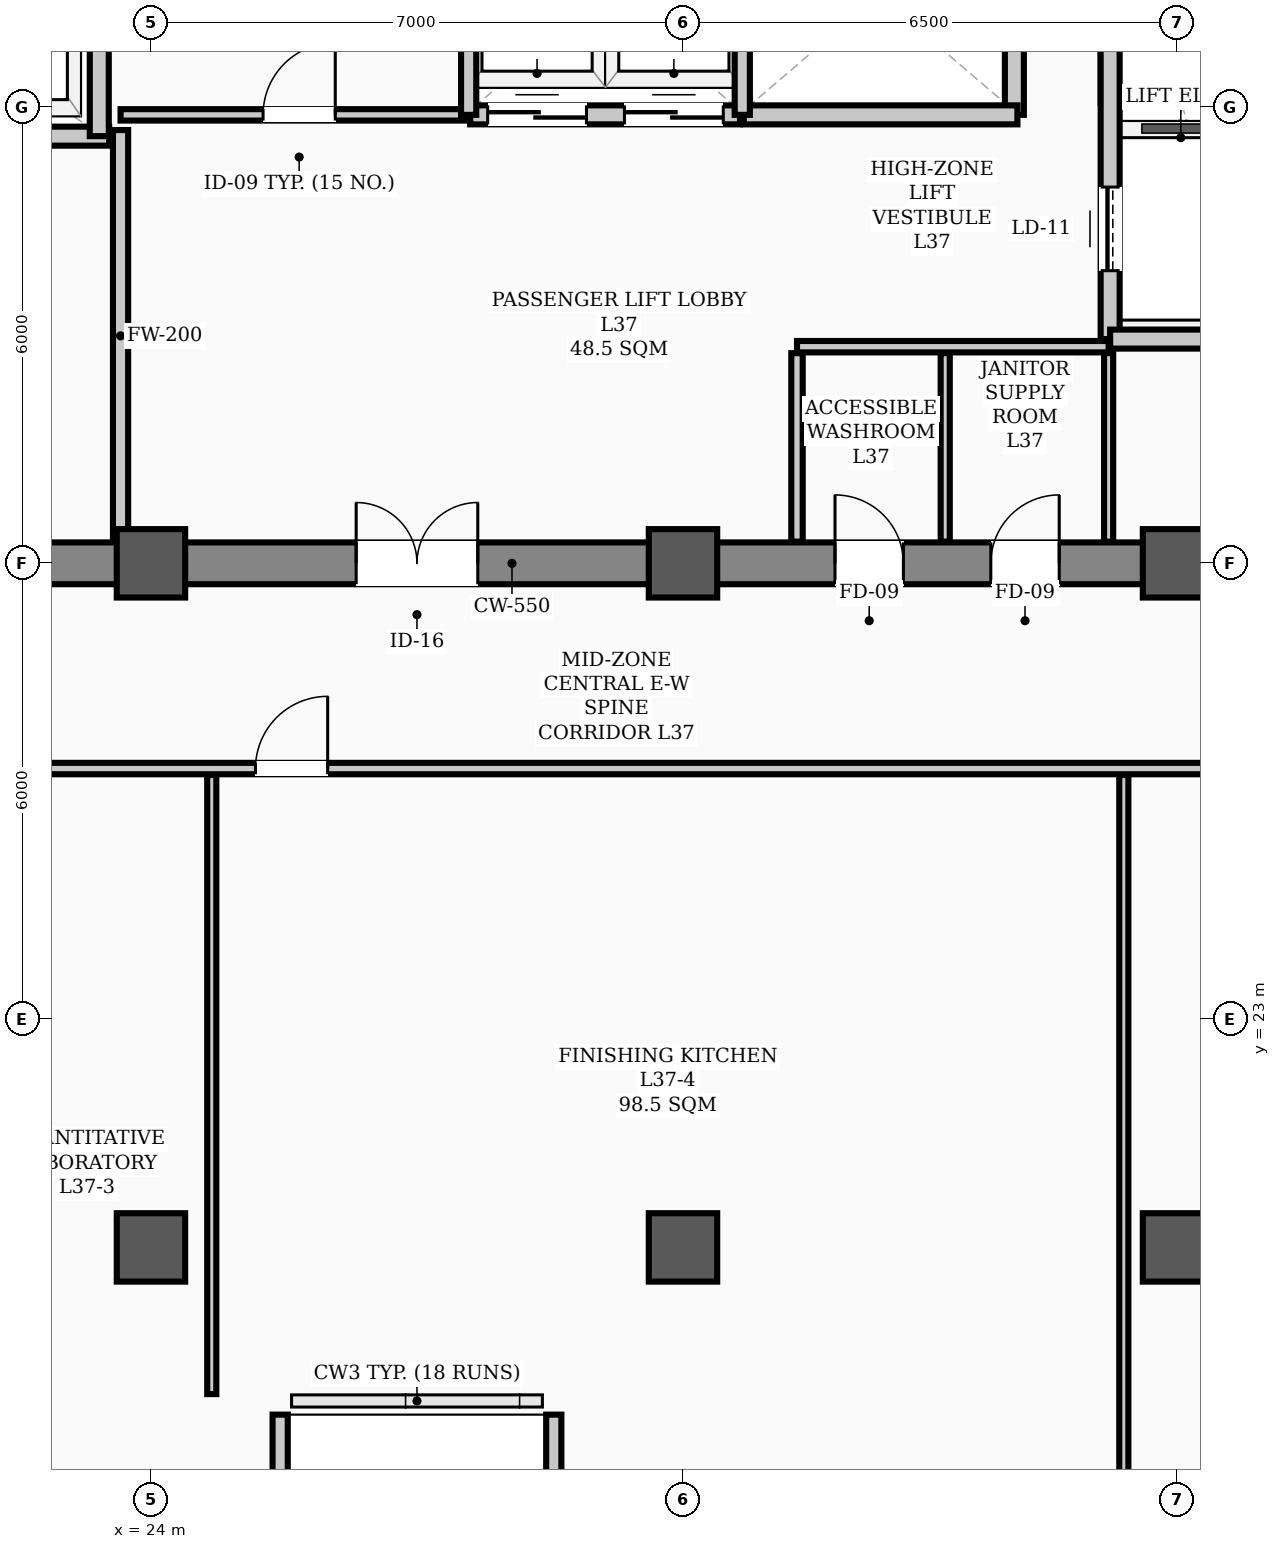
"""IFC4 building model, lengths in metres.
Left out: names, types, materials, properties, quantities, classifications, styles, units other than length and angle.
Written with IfcOpenShell. Run it as: python <this file> out.ifc"""

import sys

from ifc_helpers import new_model, si_unit, direction, frame, frame_2d, origin, origin_2d, place, context, subcontext, project, spatial, rectangle, hollow_rectangle, extrude, element, fill, save


model = new_model("IFC4")
c1 = context("Model", 3, precision=1e-05, world=origin(), true_north=direction((0.0, 1.0)))
c2 = subcontext(c1, "Body", "Model", "MODEL_VIEW")
j1 = project(units=[si_unit("LENGTHUNIT", "METRE"), si_unit("PLANEANGLEUNIT", "RADIAN")], contexts=[c1])
p1 = place(None, origin())
s1 = spatial("IfcSite", under=j1, at=p1, CompositionType="ELEMENT")
p2 = place(p1, origin())
s2 = spatial("IfcBuilding", under=s1, at=p2, CompositionType="ELEMENT")
p3 = place(p2, frame((0.0, 0.0, 150.0)))
s3 = spatial("IfcBuildingStorey", under=s2, at=p3, CompositionType="ELEMENT", Elevation=150.0)
for number, where, z_axis, x_axis in (
    (1, (24.0, 29.0, 0.0), (0.0, 0.0, 1.0), (1.0, 0.0, 0.0)),
    (2, (31.0, 29.0, 0.0), (0.0, 0.0, 1.0), (1.0, 0.0, 0.0)),
    (3, (37.5, 29.0, 0.0), (0.0, 0.0, 1.0), (1.0, 0.0, 0.0)),
    (4, (24.0, 20.0, 0.0), (0.0, 0.0, 1.0), (1.0, 0.0, 0.0)),
    (5, (31.0, 20.0, 0.0), (0.0, 0.0, 1.0), (1.0, 0.0, 0.0)),
    (6, (37.5, 20.0, 0.0), (0.0, 0.0, 1.0), (1.0, 0.0, 0.0)),
):
    element("IfcColumn", number, at=place(p3, frame(where, z_axis=z_axis, x_axis=x_axis)), inside=s3, PredefinedType="COLUMN", context=c2, shape_type="SweptSolid", body=[
        extrude(hollow_rectangle(XDim=0.9, YDim=0.9, WallThickness=0.035, InnerFilletRadius=0.017, OuterFilletRadius=0.052, at=origin_2d()), origin(), (0.0, 0.0, 1.0), 3.9),
    ])
for number, where, z_axis, x_axis in (
    (7, (25.7, 16.1, 0.0), (0.0, 0.0, 1.0), (0.0, 1.0, 0.0)),
    (8, (29.3, 17.8, 0.0), (0.0, 0.0, 1.0), (0.0, -1.0, 0.0)),
):
    element("IfcWall", number, at=place(p3, frame(where, z_axis=z_axis, x_axis=x_axis)), inside=s3, PredefinedType="PARAPET", context=c2, shape_type="SweptSolid", body=[
        extrude(rectangle(XDim=1.7, YDim=0.2, at=frame_2d((0.85, 0.0))), origin(), (0.0, 0.0, 1.0), 1.2),
    ])
p4 = place(p3, frame((13.5, 29.0, 0.0), z_axis=(0.0, 0.0, 1.0), x_axis=(1.0, 0.0, 0.0)))
e9 = element("IfcWall", 9, at=p4, inside=s3, PredefinedType="SHEAR", context=c2, shape_type="SweptSolid", body=[
    extrude(rectangle(XDim=30.5, YDim=0.55, at=frame_2d((15.25, 0.0))), origin(), (0.0, 0.0, 1.0), 3.72),
])
p5 = place(p4, frame((1.75, 0.0, 0.0)))
e10 = element("IfcOpeningElement", 10, at=p5, cuts=e9, PredefinedType="OPENING", context=c2, shape_type="SweptSolid", body=[
    extrude(rectangle(XDim=1.1, YDim=2.08, at=frame_2d((0.55, 1.04))), frame((0.0, 0.285, 0.0), z_axis=(0.0, -1.0, 0.0), x_axis=(1.0, 0.0, 0.0)), (0.0, 0.0, 1.0), 0.57),
])
p6 = place(p4, frame((26.7, 0.0, 0.0)))
e11 = element("IfcOpeningElement", 11, at=p6, cuts=e9, PredefinedType="OPENING", context=c2, shape_type="SweptSolid", body=[
    extrude(rectangle(XDim=1.1, YDim=2.08, at=frame_2d((0.55, 1.04))), frame((0.0, 0.285, 0.0), z_axis=(0.0, -1.0, 0.0), x_axis=(1.0, 0.0, 0.0)), (0.0, 0.0, 1.0), 0.57),
])
p7 = place(p4, frame((6.8, 0.0, 0.0)))
e12 = element("IfcOpeningElement", 12, at=p7, cuts=e9, PredefinedType="OPENING", context=c2, shape_type="SweptSolid", body=[
    extrude(rectangle(XDim=1.1, YDim=2.08, at=frame_2d((0.55, 1.04))), frame((0.0, 0.285, 0.0), z_axis=(0.0, -1.0, 0.0), x_axis=(1.0, 0.0, 0.0)), (0.0, 0.0, 1.0), 0.57),
])
p8 = place(p4, frame((13.2, 0.0, 0.0)))
e13 = element("IfcOpeningElement", 13, at=p8, cuts=e9, PredefinedType="OPENING", context=c2, shape_type="SweptSolid", body=[
    extrude(rectangle(XDim=1.6, YDim=2.08, at=frame_2d((0.8, 1.04))), frame((0.0, 0.285, 0.0), z_axis=(0.0, -1.0, 0.0), x_axis=(1.0, 0.0, 0.0)), (0.0, 0.0, 1.0), 0.57),
])
p9 = place(p4, frame((19.5, 0.0, 0.0)))
e14 = element("IfcOpeningElement", 14, at=p9, cuts=e9, PredefinedType="OPENING", context=c2, shape_type="SweptSolid", body=[
    extrude(rectangle(XDim=0.9, YDim=2.08, at=frame_2d((0.45, 1.04))), frame((0.0, 0.285, 0.0), z_axis=(0.0, -1.0, 0.0), x_axis=(1.0, 0.0, 0.0)), (0.0, 0.0, 1.0), 0.57),
])
p10 = place(p4, frame((21.55, 0.0, 0.0)))
e15 = element("IfcOpeningElement", 15, at=p10, cuts=e9, PredefinedType="OPENING", context=c2, shape_type="SweptSolid", body=[
    extrude(rectangle(XDim=0.9, YDim=2.08, at=frame_2d((0.45, 1.04))), frame((0.0, 0.285, 0.0), z_axis=(0.0, -1.0, 0.0), x_axis=(1.0, 0.0, 0.0)), (0.0, 0.0, 1.0), 0.57),
])
p11 = place(p3, frame((18.1, 34.62, 0.0), z_axis=(0.0, 0.0, 1.0), x_axis=(1.0, 0.0, 0.0)))
e16 = element("IfcWall", 16, at=p11, inside=s3, PredefinedType="STANDARD", context=c2, shape_type="SweptSolid", body=[
    extrude(rectangle(XDim=5.35, YDim=0.25, at=frame_2d((2.675, 0.0))), origin(), (0.0, 0.0, 1.0), 3.72),
])
p12 = place(p11, frame((0.85, 0.0, 0.0)))
e17 = element("IfcOpeningElement", 17, at=p12, cuts=e16, PredefinedType="OPENING", context=c2, shape_type="SweptSolid", body=[
    extrude(rectangle(XDim=1.1, YDim=2.08, at=frame_2d((0.55, 1.04))), frame((0.0, 0.135, 0.0), z_axis=(0.0, -1.0, 0.0), x_axis=(1.0, 0.0, 0.0)), (0.0, 0.0, 1.0), 0.27),
])
p13 = place(p11, frame((3.45, 0.0, 0.0)))
e18 = element("IfcOpeningElement", 18, at=p13, cuts=e16, PredefinedType="OPENING", context=c2, shape_type="SweptSolid", body=[
    extrude(rectangle(XDim=1.1, YDim=2.08, at=frame_2d((0.55, 1.04))), frame((0.0, 0.135, 0.0), z_axis=(0.0, -1.0, 0.0), x_axis=(1.0, 0.0, 0.0)), (0.0, 0.0, 1.0), 0.27),
])
p14 = place(p3, frame((36.62, 31.95, 0.0), z_axis=(0.0, 0.0, 1.0), x_axis=(0.0, 1.0, 0.0)))
e19 = element("IfcWall", 19, at=p14, inside=s3, PredefinedType="STANDARD", context=c2, shape_type="SweptSolid", body=[
    extrude(rectangle(XDim=6.0, YDim=0.25, at=frame_2d((3.0, 0.0))), origin(), (0.0, 0.0, 1.0), 3.35),
])
p15 = place(p14, frame((0.9, 0.0, 0.0)))
e20 = element("IfcOpeningElement", 20, at=p15, cuts=e19, PredefinedType="OPENING", context=c2, shape_type="SweptSolid", body=[
    extrude(rectangle(XDim=1.1, YDim=2.08, at=frame_2d((0.55, 1.04))), frame((0.0, 0.135, 0.0), z_axis=(0.0, -1.0, 0.0), x_axis=(1.0, 0.0, 0.0)), (0.0, 0.0, 1.0), 0.27),
])
p16 = place(p14, frame((4.0, 0.0, 0.0)))
e21 = element("IfcOpeningElement", 21, at=p16, cuts=e19, PredefinedType="OPENING", context=c2, shape_type="SweptSolid", body=[
    extrude(rectangle(XDim=1.1, YDim=2.08, at=frame_2d((0.55, 1.04))), frame((0.0, 0.135, 0.0), z_axis=(0.0, -1.0, 0.0), x_axis=(1.0, 0.0, 0.0)), (0.0, 0.0, 1.0), 0.27),
])
p17 = place(p3, frame((36.62, 31.95, 0.0), z_axis=(0.0, 0.0, 1.0), x_axis=(1.0, 0.0, 0.0)))
e22 = element("IfcWall", 22, at=p17, inside=s3, PredefinedType="STANDARD", context=c2, shape_type="SweptSolid", body=[
    extrude(rectangle(XDim=1.9, YDim=0.25, at=frame_2d((0.95, 0.0))), origin(), (0.0, 0.0, 1.0), 3.48),
])
p18 = place(p3, frame((23.32, 34.62, 0.0), z_axis=(0.0, 0.0, 1.0), x_axis=(0.0, 1.0, 0.0)))
e23 = element("IfcWall", 23, at=p18, inside=s3, PredefinedType="STANDARD", context=c2, shape_type="SweptSolid", body=[
    extrude(rectangle(XDim=3.33, YDim=0.25, at=frame_2d((1.665, 0.0))), origin(), (0.0, 0.0, 1.0), 3.35),
])
p19 = place(p3, frame((35.36, 34.9, 0.0), z_axis=(0.0, 0.0, 1.0), x_axis=(0.0, 1.0, 0.0)))
e24 = element("IfcWall", 24, at=p19, inside=s3, PredefinedType="STANDARD", context=c2, shape_type="SweptSolid", body=[
    extrude(rectangle(XDim=3.05, YDim=0.25, at=frame_2d((1.525, 0.0))), origin(), (0.0, 0.0, 1.0), 3.35),
])
p20 = place(p3, frame((28.2, 34.9, 0.0), z_axis=(0.0, 0.0, 1.0), x_axis=(1.0, 0.0, 0.0)))
e25 = element("IfcWall", 25, at=p20, inside=s3, PredefinedType="STANDARD", context=c2, shape_type="SweptSolid", body=[
    extrude(rectangle(XDim=3.55, YDim=0.25, at=frame_2d((1.775, 0.0))), origin(), (0.0, 0.0, 1.0), 3.72),
])
p21 = place(p20, frame((0.23, 0.0, 0.0)))
e26 = element("IfcOpeningElement", 26, at=p21, cuts=e25, PredefinedType="OPENING", context=c2, shape_type="SweptSolid", body=[
    extrude(rectangle(XDim=1.3, YDim=2.08, at=frame_2d((0.65, 1.04))), frame((0.0, 0.135, 0.0), z_axis=(0.0, -1.0, 0.0), x_axis=(1.0, 0.0, 0.0)), (0.0, 0.0, 1.0), 0.27),
])
p22 = place(p20, frame((2.03, 0.0, 0.0)))
e27 = element("IfcOpeningElement", 27, at=p22, cuts=e25, PredefinedType="OPENING", context=c2, shape_type="SweptSolid", body=[
    extrude(rectangle(XDim=1.3, YDim=2.08, at=frame_2d((0.65, 1.04))), frame((0.0, 0.135, 0.0), z_axis=(0.0, -1.0, 0.0), x_axis=(1.0, 0.0, 0.0)), (0.0, 0.0, 1.0), 0.27),
])
p23 = place(p3, frame((31.8, 34.9, 0.0), z_axis=(0.0, 0.0, 1.0), x_axis=(1.0, 0.0, 0.0)))
e28 = element("IfcWall", 28, at=p23, inside=s3, PredefinedType="STANDARD", context=c2, shape_type="SweptSolid", body=[
    extrude(rectangle(XDim=3.6, YDim=0.25, at=frame_2d((1.8, 0.0))), origin(), (0.0, 0.0, 1.0), 3.72),
])
p24 = place(p3, frame((23.6, 34.9, 0.0), z_axis=(0.0, 0.0, 1.0), x_axis=(1.0, 0.0, 0.0)))
e29 = element("IfcWall", 29, at=p24, inside=s3, PredefinedType="PARTITIONING", context=c2, shape_type="SweptSolid", body=[
    extrude(rectangle(XDim=4.58, YDim=0.15, at=frame_2d((2.29, 0.0))), origin(), (0.0, 0.0, 1.0), 3.72),
])
p25 = place(p24, frame((1.875, 0.0, 0.0)))
e30 = element("IfcOpeningElement", 30, at=p25, cuts=e29, PredefinedType="OPENING", context=c2, shape_type="SweptSolid", body=[
    extrude(rectangle(XDim=0.95, YDim=2.08, at=frame_2d((0.475, 1.04))), frame((0.0, 0.085, 0.0), z_axis=(0.0, -1.0, 0.0), x_axis=(1.0, 0.0, 0.0)), (0.0, 0.0, 1.0), 0.17),
])
p26 = place(p3, frame((32.5, 31.85, 0.0), z_axis=(0.0, 0.0, 1.0), x_axis=(1.0, 0.0, 0.0)))
e31 = element("IfcWall", 31, at=p26, inside=s3, PredefinedType="PARTITIONING", context=c2, shape_type="SweptSolid", body=[
    extrude(rectangle(XDim=4.1, YDim=0.15, at=frame_2d((2.05, 0.0))), origin(), (0.0, 0.0, 1.0), 3.72),
])
p27 = place(p3, frame((2.31, 26.3, 0.0), z_axis=(0.0, 0.0, 1.0), x_axis=(1.0, 0.0, 0.0)))
e32 = element("IfcWall", 32, at=p27, inside=s3, PredefinedType="PARTITIONING", context=c2, shape_type="SweptSolid", body=[
    extrude(rectangle(XDim=46.38, YDim=0.15, at=frame_2d((23.19, 0.0))), origin(), (0.0, 0.0, 1.0), 3.2),
])
p28 = place(p27, frame((9.39, 0.0, 0.0)))
e33 = element("IfcOpeningElement", 33, at=p28, cuts=e32, PredefinedType="OPENING", context=c2, shape_type="SweptSolid", body=[
    extrude(rectangle(XDim=0.95, YDim=2.08, at=frame_2d((0.475, 1.04))), frame((0.0, 0.085, 0.0), z_axis=(0.0, -1.0, 0.0), x_axis=(1.0, 0.0, 0.0)), (0.0, 0.0, 1.0), 0.17),
])
p29 = place(p27, frame((14.215, 0.0, 0.0)))
e34 = element("IfcOpeningElement", 34, at=p29, cuts=e32, PredefinedType="OPENING", context=c2, shape_type="SweptSolid", body=[
    extrude(rectangle(XDim=0.95, YDim=2.08, at=frame_2d((0.475, 1.04))), frame((0.0, 0.085, 0.0), z_axis=(0.0, -1.0, 0.0), x_axis=(1.0, 0.0, 0.0)), (0.0, 0.0, 1.0), 0.17),
])
p30 = place(p27, frame((19.115, 0.0, 0.0)))
e35 = element("IfcOpeningElement", 35, at=p30, cuts=e32, PredefinedType="OPENING", context=c2, shape_type="SweptSolid", body=[
    extrude(rectangle(XDim=0.95, YDim=2.08, at=frame_2d((0.475, 1.04))), frame((0.0, 0.085, 0.0), z_axis=(0.0, -1.0, 0.0), x_axis=(1.0, 0.0, 0.0)), (0.0, 0.0, 1.0), 0.17),
])
p31 = place(p27, frame((23.065, 0.0, 0.0)))
e36 = element("IfcOpeningElement", 36, at=p31, cuts=e32, PredefinedType="OPENING", context=c2, shape_type="SweptSolid", body=[
    extrude(rectangle(XDim=0.95, YDim=2.08, at=frame_2d((0.475, 1.04))), frame((0.0, 0.085, 0.0), z_axis=(0.0, -1.0, 0.0), x_axis=(1.0, 0.0, 0.0)), (0.0, 0.0, 1.0), 0.17),
])
p32 = place(p27, frame((37.715, 0.0, 0.0)))
e37 = element("IfcOpeningElement", 37, at=p32, cuts=e32, PredefinedType="OPENING", context=c2, shape_type="SweptSolid", body=[
    extrude(rectangle(XDim=0.95, YDim=2.08, at=frame_2d((0.475, 1.04))), frame((0.0, 0.085, 0.0), z_axis=(0.0, -1.0, 0.0), x_axis=(1.0, 0.0, 0.0)), (0.0, 0.0, 1.0), 0.17),
])
p33 = place(p27, frame((43.66, 0.0, 0.0)))
e38 = element("IfcOpeningElement", 38, at=p33, cuts=e32, PredefinedType="OPENING", context=c2, shape_type="SweptSolid", body=[
    extrude(rectangle(XDim=0.95, YDim=2.08, at=frame_2d((0.475, 1.04))), frame((0.0, 0.085, 0.0), z_axis=(0.0, -1.0, 0.0), x_axis=(1.0, 0.0, 0.0)), (0.0, 0.0, 1.0), 0.17),
])
p34 = place(p3, frame((23.6, 29.285, 0.0), z_axis=(0.0, 0.0, 1.0), x_axis=(0.0, 1.0, 0.0)))
e39 = element("IfcWall", 39, at=p34, inside=s3, PredefinedType="STANDARD", context=c2, shape_type="SweptSolid", body=[
    extrude(rectangle(XDim=5.415, YDim=0.2, at=frame_2d((2.708, 0.0))), origin(), (0.0, 0.0, 1.0), 3.2),
])
p35 = place(p3, frame((32.5, 29.285, 0.0), z_axis=(0.0, 0.0, 1.0), x_axis=(0.0, 1.0, 0.0)))
e40 = element("IfcWall", 40, at=p35, inside=s3, PredefinedType="PARTITIONING", context=c2, shape_type="SweptSolid", body=[
    extrude(rectangle(XDim=2.48, YDim=0.15, at=frame_2d((1.24, 0.0))), origin(), (0.0, 0.0, 1.0), 3.35),
])
for number, where, z_axis, x_axis in (
    (41, (36.6, 29.285, 0.0), (0.0, 0.0, 1.0), (0.0, 1.0, 0.0)),
    (42, (34.45, 29.285, 0.0), (0.0, 0.0, 1.0), (0.0, 1.0, 0.0)),
):
    element("IfcWall", number, at=place(p3, frame(where, z_axis=z_axis, x_axis=x_axis)), inside=s3, PredefinedType="PARTITIONING", context=c2, shape_type="SweptSolid", body=[
        extrude(rectangle(XDim=2.48, YDim=0.12, at=frame_2d((1.24, 0.0))), origin(), (0.0, 0.0, 1.0), 3.35),
    ])
p36 = place(p3, frame((24.8, 18.07, 0.0), z_axis=(0.0, 0.0, 1.0), x_axis=(0.0, 1.0, 0.0)))
e43 = element("IfcWall", 43, at=p36, inside=s3, PredefinedType="PARTITIONING", context=c2, shape_type="SweptSolid", body=[
    extrude(rectangle(XDim=8.145, YDim=0.12, at=frame_2d((4.073, 0.0))), origin(), (0.0, 0.0, 1.0), 3.1),
])
p37 = place(p3, frame((36.8, 16.31, 0.0), z_axis=(0.0, 0.0, 1.0), x_axis=(0.0, 1.0, 0.0)))
e44 = element("IfcWall", 44, at=p37, inside=s3, PredefinedType="PARTITIONING", context=c2, shape_type="SweptSolid", body=[
    extrude(rectangle(XDim=9.905, YDim=0.12, at=frame_2d((4.953, 0.0))), origin(), (0.0, 0.0, 1.0), 3.1),
])
for number, where, z_axis, x_axis in (
    (45, (28.18, 34.9, 0.0), (0.0, 0.0, 1.0), (0.0, 1.0, 0.0)),
    (46, (31.78, 34.9, 0.0), (0.0, 0.0, 1.0), (0.0, 1.0, 0.0)),
):
    element("IfcWall", number, at=place(p3, frame(where, z_axis=z_axis, x_axis=x_axis)), inside=s3, PredefinedType="STANDARD", context=c2, shape_type="SweptSolid", body=[
        extrude(rectangle(XDim=3.12, YDim=0.2, at=frame_2d((1.56, 0.0))), origin(), (0.0, 0.0, 1.0), 3.35),
    ])
p38 = place(p8, origin())
e47 = element("IfcDoor", 47, at=p38, inside=s3, OperationType="DOUBLE_DOOR_SINGLE_SWING", PredefinedType="DOOR", context=c2, shape_type="SweptSolid", body=[
    extrude(rectangle(XDim=1.6, YDim=2.08, at=frame_2d((0.8, 1.04))), frame((0.0, 0.025, 0.0), z_axis=(0.0, -1.0, 0.0), x_axis=(1.0, 0.0, 0.0)), (0.0, 0.0, 1.0), 0.05),
])
fill(e13, e47)
p39 = place(p25, origin())
e48 = element("IfcDoor", 48, at=p39, inside=s3, OperationType="SINGLE_SWING_RIGHT", PredefinedType="DOOR", context=c2, shape_type="SweptSolid", body=[
    extrude(rectangle(XDim=0.95, YDim=2.08, at=frame_2d((0.475, 1.04))), frame((0.0, 0.025, 0.0), z_axis=(0.0, -1.0, 0.0), x_axis=(1.0, 0.0, 0.0)), (0.0, 0.0, 1.0), 0.05),
])
fill(e30, e48)
p40 = place(p9, origin())
e49 = element("IfcDoor", 49, at=p40, inside=s3, OperationType="SINGLE_SWING_LEFT", PredefinedType="DOOR", context=c2, shape_type="SweptSolid", body=[
    extrude(rectangle(XDim=0.9, YDim=2.08, at=frame_2d((0.45, 1.04))), frame((0.0, 0.025, 0.0), z_axis=(0.0, -1.0, 0.0), x_axis=(1.0, 0.0, 0.0)), (0.0, 0.0, 1.0), 0.05),
])
fill(e14, e49)
p41 = place(p10, origin())
e50 = element("IfcDoor", 50, at=p41, inside=s3, OperationType="SINGLE_SWING_RIGHT", PredefinedType="DOOR", context=c2, shape_type="SweptSolid", body=[
    extrude(rectangle(XDim=0.9, YDim=2.08, at=frame_2d((0.45, 1.04))), frame((0.0, 0.025, 0.0), z_axis=(0.0, -1.0, 0.0), x_axis=(1.0, 0.0, 0.0)), (0.0, 0.0, 1.0), 0.05),
])
fill(e15, e50)
p42 = place(p31, origin())
e51 = element("IfcDoor", 51, at=p42, inside=s3, OperationType="SINGLE_SWING_RIGHT", PredefinedType="DOOR", context=c2, shape_type="SweptSolid", body=[
    extrude(rectangle(XDim=0.95, YDim=2.08, at=frame_2d((0.475, 1.04))), frame((0.0, 0.025, 0.0), z_axis=(0.0, -1.0, 0.0), x_axis=(1.0, 0.0, 0.0)), (0.0, 0.0, 1.0), 0.05),
])
fill(e36, e51)
p43 = place(p15, origin())
e52 = element("IfcDoor", 52, at=p43, inside=s3, OperationType="SLIDING_TO_LEFT", PredefinedType="DOOR", context=c2, shape_type="SweptSolid", body=[
    extrude(rectangle(XDim=1.1, YDim=2.08, at=frame_2d((0.55, 1.04))), frame((0.0, 0.025, 0.0), z_axis=(0.0, -1.0, 0.0), x_axis=(1.0, 0.0, 0.0)), (0.0, 0.0, 1.0), 0.05),
])
fill(e20, e52)
p44 = place(p21, origin())
e53 = element("IfcDoor", 53, at=p44, inside=s3, OperationType="DOUBLE_DOOR_SLIDING", PredefinedType="DOOR", context=c2, shape_type="SweptSolid", body=[
    extrude(rectangle(XDim=1.3, YDim=2.08, at=frame_2d((0.65, 1.04))), frame((0.0, 0.025, 0.0), z_axis=(0.0, -1.0, 0.0), x_axis=(1.0, 0.0, 0.0)), (0.0, 0.0, 1.0), 0.05),
])
fill(e26, e53)
p45 = place(p22, origin())
e54 = element("IfcDoor", 54, at=p45, inside=s3, OperationType="DOUBLE_DOOR_SLIDING", PredefinedType="DOOR", context=c2, shape_type="SweptSolid", body=[
    extrude(rectangle(XDim=1.3, YDim=2.08, at=frame_2d((0.65, 1.04))), frame((0.0, 0.025, 0.0), z_axis=(0.0, -1.0, 0.0), x_axis=(1.0, 0.0, 0.0)), (0.0, 0.0, 1.0), 0.05),
])
fill(e27, e54)
save(model, sys.argv[1])
